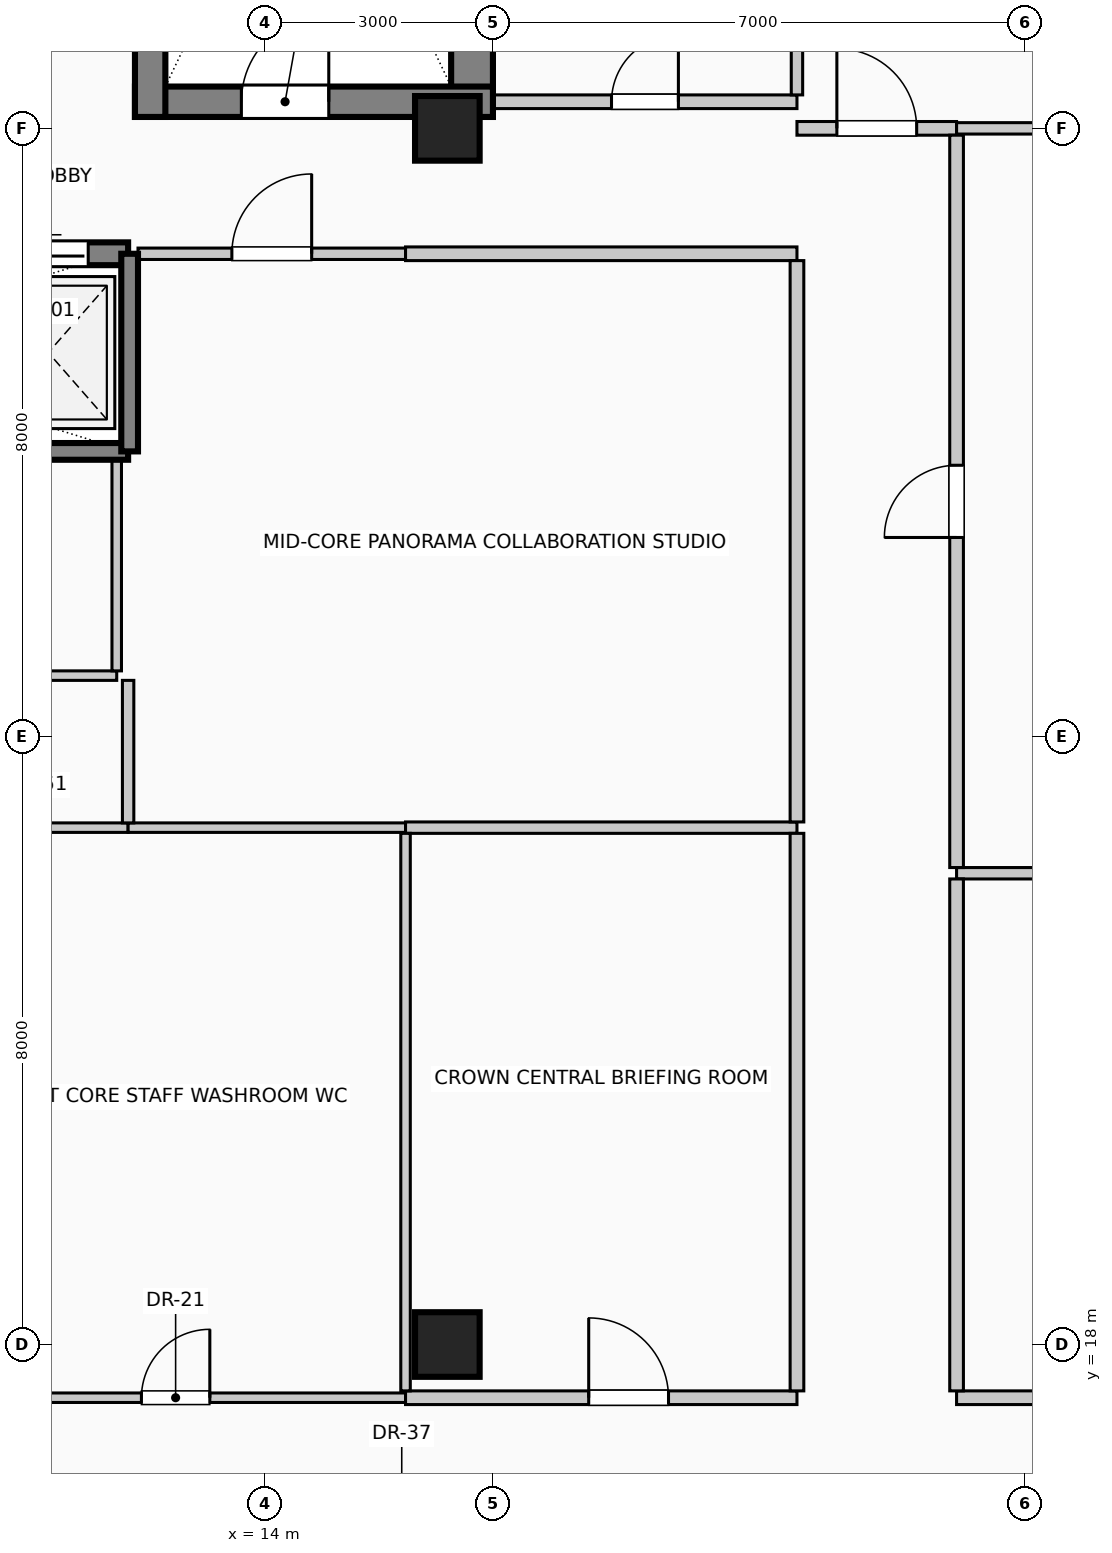
"""IFC4 building model, lengths in metres.
Left out: names, types, materials, properties, quantities, classifications, styles, units other than length and angle.
Written with IfcOpenShell. Run it as: python <this file> out.ifc"""

import sys

from ifc_helpers import new_model, si_unit, direction, frame, frame_2d, origin, origin_2d, place, context, subcontext, project, spatial, rectangle, circle, extrude, element, fill, save


model = new_model("IFC4")
c1 = context("Model", 3, precision=1e-05, world=origin(), true_north=direction((0.0, 1.0)))
c2 = subcontext(c1, "Body", "Model", "MODEL_VIEW")
j1 = project(units=[si_unit("LENGTHUNIT", "METRE"), si_unit("PLANEANGLEUNIT", "RADIAN")], contexts=[c1])
p1 = place(None, origin())
s1 = spatial("IfcSite", under=j1, at=p1, CompositionType="ELEMENT")
p2 = place(p1, origin())
s2 = spatial("IfcBuilding", under=s1, at=p2, CompositionType="ELEMENT")
p3 = place(p2, frame((0.0, 0.0, 297.0)))
s3 = spatial("IfcBuildingStorey", under=s2, at=p3, CompositionType="ELEMENT", Elevation=297.0)
p4 = place(p3, frame((16.725, 34.15, 0.0), z_axis=(0.0, 0.0, 1.0), x_axis=(0.0, 1.0, 0.0)))
e1 = element("IfcWall", 1, at=p4, inside=s3, PredefinedType="SHEAR", context=c2, shape_type="SweptSolid", body=[
    extrude(rectangle(XDim=8.83, YDim=0.55, at=frame_2d((4.415, 0.0))), origin(), (0.0, 0.0, 1.0), 4.0),
])
p5 = place(p3, frame((12.29, 34.35, 0.0), z_axis=(0.0, 0.0, 1.0), x_axis=(1.0, 0.0, 0.0)))
e2 = element("IfcWall", 2, at=p5, inside=s3, PredefinedType="SHEAR", context=c2, shape_type="SweptSolid", body=[
    extrude(rectangle(XDim=4.71, YDim=0.4, at=frame_2d((2.355, 0.0))), origin(), (0.0, 0.0, 1.0), 4.0),
])
p6 = place(p5, frame((1.4, 0.0, 0.0)))
e3 = element("IfcOpeningElement", 3, at=p6, cuts=e2, PredefinedType="OPENING", context=c2, shape_type="SweptSolid", body=[
    extrude(rectangle(XDim=1.15, YDim=2.2, at=frame_2d((0.575, 1.1))), frame((0.0, 0.21, 0.0), z_axis=(0.0, -1.0, 0.0), x_axis=(1.0, 0.0, 0.0)), (0.0, 0.0, 1.0), 0.42),
])
p7 = place(p3, frame((12.49, 34.15, 0.0), z_axis=(0.0, 0.0, 1.0), x_axis=(0.0, 1.0, 0.0)))
e4 = element("IfcWall", 4, at=p7, inside=s3, PredefinedType="SHEAR", context=c2, shape_type="SweptSolid", body=[
    extrude(rectangle(XDim=8.83, YDim=0.4, at=frame_2d((4.415, 0.0))), origin(), (0.0, 0.0, 1.0), 4.0),
])
for number, where, z_axis, x_axis in (
    (5, (16.4, 18.0, 0.0), (0.0, 0.0, 1.0), (1.0, 0.0, 0.0)),
    (6, (16.4, 34.0, 0.0), (0.0, 0.0, 1.0), (1.0, 0.0, 0.0)),
):
    element("IfcColumn", number, at=place(p3, frame(where, z_axis=z_axis, x_axis=x_axis)), inside=s3, PredefinedType="COLUMN", context=c2, shape_type="SweptSolid", body=[
        extrude(circle(Radius=0.425, at=origin_2d()), origin(), (0.0, 0.0, 1.0), 4.0),
    ])
p8 = place(p3, frame((10.05, 32.35, 0.0), z_axis=(0.0, 0.0, 1.0), x_axis=(1.0, 0.0, 0.0)))
e7 = element("IfcWall", 7, at=p8, inside=s3, PredefinedType="SOLIDWALL", context=c2, shape_type="SweptSolid", body=[
    extrude(rectangle(XDim=2.15, YDim=0.3, at=frame_2d((1.075, 0.0))), origin(), (0.0, 0.0, 1.0), 4.0),
])
p9 = place(p8, frame((0.525, 0.0, 0.0)))
e8 = element("IfcOpeningElement", 8, at=p9, cuts=e7, PredefinedType="OPENING", context=c2, shape_type="SweptSolid", body=[
    extrude(rectangle(XDim=1.1, YDim=2.2, at=frame_2d((0.55, 1.1))), frame((0.0, 0.16, 0.0), z_axis=(0.0, -1.0, 0.0), x_axis=(1.0, 0.0, 0.0)), (0.0, 0.0, 1.0), 0.32),
])
p10 = place(p3, frame((3.55, 29.75, 0.0), z_axis=(0.0, 0.0, 1.0), x_axis=(1.0, 0.0, 0.0)))
e9 = element("IfcWall", 9, at=p10, inside=s3, PredefinedType="SOLIDWALL", context=c2, shape_type="SweptSolid", body=[
    extrude(rectangle(XDim=8.65, YDim=0.22, at=frame_2d((4.325, 0.0))), origin(), (0.0, 0.0, 1.0), 4.0),
])
p11 = place(p3, frame((12.22, 29.75, 0.0), z_axis=(0.0, 0.0, 1.0), x_axis=(0.0, 1.0, 0.0)))
e10 = element("IfcWall", 10, at=p11, inside=s3, PredefinedType="SOLIDWALL", context=c2, shape_type="SweptSolid", body=[
    extrude(rectangle(XDim=2.6, YDim=0.22, at=frame_2d((1.3, 0.0))), origin(), (0.0, 0.0, 1.0), 4.0),
])
p12 = place(p3, frame((9.8, 17.3, 0.0), z_axis=(0.0, 0.0, 1.0), x_axis=(1.0, 0.0, 0.0)))
e11 = element("IfcWall", 11, at=p12, inside=s3, PredefinedType="PARTITIONING", context=c2, shape_type="SweptSolid", body=[
    extrude(rectangle(XDim=6.05, YDim=0.125, at=frame_2d((3.025, 0.0))), origin(), (0.0, 0.0, 1.0), 3.775),
])
p13 = place(p12, frame((2.575, 0.0, 0.0)))
e12 = element("IfcOpeningElement", 12, at=p13, cuts=e11, PredefinedType="OPENING", context=c2, shape_type="SweptSolid", body=[
    extrude(rectangle(XDim=0.9, YDim=2.1, at=frame_2d((0.45, 1.05))), frame((0.0, 0.073, 0.0), z_axis=(0.0, -1.0, 0.0), x_axis=(1.0, 0.0, 0.0)), (0.0, 0.0, 1.0), 0.145),
])
p14 = place(p3, frame((15.85, 17.3, 0.0), z_axis=(0.0, 0.0, 1.0), x_axis=(1.0, 0.0, 0.0)))
e13 = element("IfcWall", 13, at=p14, inside=s3, PredefinedType="PARTITIONING", context=c2, shape_type="SweptSolid", body=[
    extrude(rectangle(XDim=5.15, YDim=0.18, at=frame_2d((2.575, 0.0))), origin(), (0.0, 0.0, 1.0), 3.775),
])
p15 = place(p14, frame((2.41, 0.0, 0.0)))
e14 = element("IfcOpeningElement", 14, at=p15, cuts=e13, PredefinedType="OPENING", context=c2, shape_type="SweptSolid", body=[
    extrude(rectangle(XDim=1.05, YDim=2.15, at=frame_2d((0.525, 1.075))), frame((0.0, 0.1, 0.0), z_axis=(0.0, -1.0, 0.0), x_axis=(1.0, 0.0, 0.0)), (0.0, 0.0, 1.0), 0.2),
])
p16 = place(p3, frame((23.1, 17.3, 0.0), z_axis=(0.0, 0.0, 1.0), x_axis=(1.0, 0.0, 0.0)))
e15 = element("IfcWall", 15, at=p16, inside=s3, PredefinedType="PARTITIONING", context=c2, shape_type="SweptSolid", body=[
    extrude(rectangle(XDim=18.38, YDim=0.18, at=frame_2d((9.19, 0.0))), origin(), (0.0, 0.0, 1.0), 3.775),
])
p17 = place(p16, frame((8.175, 0.0, 0.0)))
e16 = element("IfcOpeningElement", 16, at=p17, cuts=e15, PredefinedType="OPENING", context=c2, shape_type="SweptSolid", body=[
    extrude(rectangle(XDim=0.95, YDim=2.15, at=frame_2d((0.475, 1.075))), frame((0.0, 0.1, 0.0), z_axis=(0.0, -1.0, 0.0), x_axis=(1.0, 0.0, 0.0)), (0.0, 0.0, 1.0), 0.2),
])
p18 = place(p3, frame((23.1, 24.2, 0.0), z_axis=(0.0, 0.0, 1.0), x_axis=(1.0, 0.0, 0.0)))
e17 = element("IfcWall", 17, at=p18, inside=s3, PredefinedType="PARTITIONING", context=c2, shape_type="SweptSolid", body=[
    extrude(rectangle(XDim=18.7, YDim=0.15, at=frame_2d((9.35, 0.0))), origin(), (0.0, 0.0, 1.0), 3.775),
])
p19 = place(p3, frame((9.8, 24.8, 0.0), z_axis=(0.0, 0.0, 1.0), x_axis=(1.0, 0.0, 0.0)))
e18 = element("IfcWall", 18, at=p19, inside=s3, PredefinedType="PARTITIONING", context=c2, shape_type="SweptSolid", body=[
    extrude(rectangle(XDim=2.4, YDim=0.125, at=frame_2d((1.2, 0.0))), origin(), (0.0, 0.0, 1.0), 3.775),
])
p20 = place(p3, frame((12.2, 24.8, 0.0), z_axis=(0.0, 0.0, 1.0), x_axis=(1.0, 0.0, 0.0)))
e19 = element("IfcWall", 19, at=p20, inside=s3, PredefinedType="PARTITIONING", context=c2, shape_type="SweptSolid", body=[
    extrude(rectangle(XDim=3.65, YDim=0.125, at=frame_2d((1.825, 0.0))), origin(), (0.0, 0.0, 1.0), 3.775),
])
p21 = place(p3, frame((15.85, 24.8, 0.0), z_axis=(0.0, 0.0, 1.0), x_axis=(1.0, 0.0, 0.0)))
e20 = element("IfcWall", 20, at=p21, inside=s3, PredefinedType="PARTITIONING", context=c2, shape_type="SweptSolid", body=[
    extrude(rectangle(XDim=5.15, YDim=0.15, at=frame_2d((2.575, 0.0))), origin(), (0.0, 0.0, 1.0), 3.775),
])
p22 = place(p3, frame((7.89, 26.8, 0.0), z_axis=(0.0, 0.0, 1.0), x_axis=(1.0, 0.0, 0.0)))
e21 = element("IfcWall", 21, at=p22, inside=s3, PredefinedType="PARTITIONING", context=c2, shape_type="SweptSolid", body=[
    extrude(rectangle(XDim=4.16, YDim=0.125, at=frame_2d((2.08, 0.0))), origin(), (0.0, 0.0, 1.0), 3.775),
])
p23 = place(p22, frame((1.62, 0.0, 0.0)))
e22 = element("IfcOpeningElement", 22, at=p23, cuts=e21, PredefinedType="OPENING", context=c2, shape_type="SweptSolid", body=[
    extrude(rectangle(XDim=0.92, YDim=2.1, at=frame_2d((0.46, 1.05))), frame((0.0, 0.073, 0.0), z_axis=(0.0, -1.0, 0.0), x_axis=(1.0, 0.0, 0.0)), (0.0, 0.0, 1.0), 0.145),
])
p24 = place(p3, frame((12.33, 32.35, 0.0), z_axis=(0.0, 0.0, 1.0), x_axis=(1.0, 0.0, 0.0)))
e23 = element("IfcWall", 23, at=p24, inside=s3, PredefinedType="PARTITIONING", context=c2, shape_type="SweptSolid", body=[
    extrude(rectangle(XDim=3.52, YDim=0.15, at=frame_2d((1.76, 0.0))), origin(), (0.0, 0.0, 1.0), 3.775),
])
p25 = place(p24, frame((1.235, 0.0, 0.0)))
e24 = element("IfcOpeningElement", 24, at=p25, cuts=e23, PredefinedType="OPENING", context=c2, shape_type="SweptSolid", body=[
    extrude(rectangle(XDim=1.05, YDim=2.15, at=frame_2d((0.525, 1.075))), frame((0.0, 0.085, 0.0), z_axis=(0.0, -1.0, 0.0), x_axis=(1.0, 0.0, 0.0)), (0.0, 0.0, 1.0), 0.17),
])
p26 = place(p3, frame((15.85, 32.35, 0.0), z_axis=(0.0, 0.0, 1.0), x_axis=(1.0, 0.0, 0.0)))
e25 = element("IfcWall", 25, at=p26, inside=s3, PredefinedType="PARTITIONING", context=c2, shape_type="SweptSolid", body=[
    extrude(rectangle(XDim=5.15, YDim=0.18, at=frame_2d((2.575, 0.0))), origin(), (0.0, 0.0, 1.0), 3.775),
])
p27 = place(p3, frame((21.0, 34.0, 0.0), z_axis=(0.0, 0.0, 1.0), x_axis=(1.0, 0.0, 0.0)))
e26 = element("IfcWall", 26, at=p27, inside=s3, PredefinedType="PARTITIONING", context=c2, shape_type="SweptSolid", body=[
    extrude(rectangle(XDim=2.1, YDim=0.18, at=frame_2d((1.05, 0.0))), origin(), (0.0, 0.0, 1.0), 3.27),
])
p28 = place(p27, frame((0.525, 0.0, 0.0)))
e27 = element("IfcOpeningElement", 27, at=p28, cuts=e26, PredefinedType="OPENING", context=c2, shape_type="SweptSolid", body=[
    extrude(rectangle(XDim=1.05, YDim=2.15, at=frame_2d((0.525, 1.075))), frame((0.0, 0.1, 0.0), z_axis=(0.0, -1.0, 0.0), x_axis=(1.0, 0.0, 0.0)), (0.0, 0.0, 1.0), 0.2),
])
p29 = place(p3, frame((23.1, 34.0, 0.0), z_axis=(0.0, 0.0, 1.0), x_axis=(1.0, 0.0, 0.0)))
e28 = element("IfcWall", 28, at=p29, inside=s3, PredefinedType="PARTITIONING", context=c2, shape_type="SweptSolid", body=[
    extrude(rectangle(XDim=5.475, YDim=0.15, at=frame_2d((2.737, 0.0))), origin(), (0.0, 0.0, 1.0), 3.27),
])
p30 = place(p3, frame((17.0, 34.35, 0.0), z_axis=(0.0, 0.0, 1.0), x_axis=(1.0, 0.0, 0.0)))
e29 = element("IfcWall", 29, at=p30, inside=s3, PredefinedType="PARTITIONING", context=c2, shape_type="SweptSolid", body=[
    extrude(rectangle(XDim=4.0, YDim=0.18, at=frame_2d((2.0, 0.0))), origin(), (0.0, 0.0, 1.0), 3.775),
])
p31 = place(p30, frame((1.56, 0.0, 0.0)))
e30 = element("IfcOpeningElement", 30, at=p31, cuts=e29, PredefinedType="OPENING", context=c2, shape_type="SweptSolid", body=[
    extrude(rectangle(XDim=0.88, YDim=2.1, at=frame_2d((0.44, 1.05))), frame((0.0, 0.1, 0.0), z_axis=(0.0, -1.0, 0.0), x_axis=(1.0, 0.0, 0.0)), (0.0, 0.0, 1.0), 0.2),
])
p32 = place(p3, frame((12.05, 26.863, 0.0), z_axis=(0.0, 0.0, 1.0), x_axis=(0.0, 1.0, 0.0)))
e31 = element("IfcWall", 31, at=p32, inside=s3, PredefinedType="PARTITIONING", context=c2, shape_type="SweptSolid", body=[
    extrude(rectangle(XDim=2.777, YDim=0.125, at=frame_2d((1.389, 0.0))), origin(), (0.0, 0.0, 1.0), 3.775),
])
p33 = place(p3, frame((12.2, 24.863, 0.0), z_axis=(0.0, 0.0, 1.0), x_axis=(0.0, 1.0, 0.0)))
e32 = element("IfcWall", 32, at=p33, inside=s3, PredefinedType="PARTITIONING", context=c2, shape_type="SweptSolid", body=[
    extrude(rectangle(XDim=1.875, YDim=0.15, at=frame_2d((0.938, 0.0))), origin(), (0.0, 0.0, 1.0), 3.775),
])
p34 = place(p3, frame((15.85, 17.39, 0.0), z_axis=(0.0, 0.0, 1.0), x_axis=(0.0, 1.0, 0.0)))
e33 = element("IfcWall", 33, at=p34, inside=s3, PredefinedType="PARTITIONING", context=c2, shape_type="SweptSolid", body=[
    extrude(rectangle(XDim=7.335, YDim=0.125, at=frame_2d((3.667, 0.0))), origin(), (0.0, 0.0, 1.0), 3.775),
])
p35 = place(p3, frame((21.0, 17.39, 0.0), z_axis=(0.0, 0.0, 1.0), x_axis=(0.0, 1.0, 0.0)))
e34 = element("IfcWall", 34, at=p35, inside=s3, PredefinedType="PARTITIONING", context=c2, shape_type="SweptSolid", body=[
    extrude(rectangle(XDim=7.335, YDim=0.18, at=frame_2d((3.667, 0.0))), origin(), (0.0, 0.0, 1.0), 3.775),
])
p36 = place(p3, frame((21.0, 24.875, 0.0), z_axis=(0.0, 0.0, 1.0), x_axis=(0.0, 1.0, 0.0)))
e35 = element("IfcWall", 35, at=p36, inside=s3, PredefinedType="PARTITIONING", context=c2, shape_type="SweptSolid", body=[
    extrude(rectangle(XDim=7.385, YDim=0.18, at=frame_2d((3.692, 0.0))), origin(), (0.0, 0.0, 1.0), 3.775),
])
p37 = place(p3, frame((21.0, 34.44, 0.0), z_axis=(0.0, 0.0, 1.0), x_axis=(0.0, 1.0, 0.0)))
e36 = element("IfcWall", 36, at=p37, inside=s3, PredefinedType="PARTITIONING", context=c2, shape_type="SweptSolid", body=[
    extrude(rectangle(XDim=10.84, YDim=0.15, at=frame_2d((5.42, 0.0))), origin(), (0.0, 0.0, 1.0), 3.775),
])
p38 = place(p3, frame((23.1, 17.39, 0.0), z_axis=(0.0, 0.0, 1.0), x_axis=(0.0, 1.0, 0.0)))
e37 = element("IfcWall", 37, at=p38, inside=s3, PredefinedType="PARTITIONING", context=c2, shape_type="SweptSolid", body=[
    extrude(rectangle(XDim=6.735, YDim=0.18, at=frame_2d((3.368, 0.0))), origin(), (0.0, 0.0, 1.0), 3.775),
])
p39 = place(p3, frame((23.1, 24.275, 0.0), z_axis=(0.0, 0.0, 1.0), x_axis=(0.0, 1.0, 0.0)))
e38 = element("IfcWall", 38, at=p39, inside=s3, PredefinedType="PARTITIONING", context=c2, shape_type="SweptSolid", body=[
    extrude(rectangle(XDim=9.635, YDim=0.18, at=frame_2d((4.817, 0.0))), origin(), (0.0, 0.0, 1.0), 3.775),
])
p40 = place(p39, frame((4.343, 0.0, 0.0)))
e39 = element("IfcOpeningElement", 39, at=p40, cuts=e38, PredefinedType="OPENING", context=c2, shape_type="SweptSolid", body=[
    extrude(rectangle(XDim=0.95, YDim=2.15, at=frame_2d((0.475, 1.075))), frame((0.0, 0.1, 0.0), z_axis=(0.0, -1.0, 0.0), x_axis=(1.0, 0.0, 0.0)), (0.0, 0.0, 1.0), 0.2),
])
p41 = place(p9, origin())
e40 = element("IfcDoor", 40, at=p41, inside=s3, OperationType="SLIDING_TO_RIGHT", PredefinedType="DOOR", context=c2, shape_type="SweptSolid", body=[
    extrude(rectangle(XDim=1.1, YDim=2.2, at=frame_2d((0.55, 1.1))), frame((0.0, 0.025, 0.0), z_axis=(0.0, -1.0, 0.0), x_axis=(1.0, 0.0, 0.0)), (0.0, 0.0, 1.0), 0.05),
])
fill(e8, e40)
p42 = place(p6, origin())
e41 = element("IfcDoor", 41, at=p42, inside=s3, OperationType="SINGLE_SWING_RIGHT", PredefinedType="DOOR", context=c2, shape_type="SweptSolid", body=[
    extrude(rectangle(XDim=1.15, YDim=2.2, at=frame_2d((0.575, 1.1))), frame((0.0, 0.025, 0.0), z_axis=(0.0, -1.0, 0.0), x_axis=(1.0, 0.0, 0.0)), (0.0, 0.0, 1.0), 0.05),
])
fill(e3, e41)
p43 = place(p13, origin())
e42 = element("IfcDoor", 42, at=p43, inside=s3, OperationType="SINGLE_SWING_RIGHT", PredefinedType="DOOR", context=c2, shape_type="SweptSolid", body=[
    extrude(rectangle(XDim=0.9, YDim=2.1, at=frame_2d((0.45, 1.05))), frame((0.0, 0.025, 0.0), z_axis=(0.0, -1.0, 0.0), x_axis=(1.0, 0.0, 0.0)), (0.0, 0.0, 1.0), 0.05),
])
fill(e12, e42)
p44 = place(p15, origin())
e43 = element("IfcDoor", 43, at=p44, inside=s3, OperationType="SINGLE_SWING_LEFT", PredefinedType="DOOR", context=c2, shape_type="SweptSolid", body=[
    extrude(rectangle(XDim=1.05, YDim=2.15, at=frame_2d((0.525, 1.075))), frame((0.0, 0.025, 0.0), z_axis=(0.0, -1.0, 0.0), x_axis=(1.0, 0.0, 0.0)), (0.0, 0.0, 1.0), 0.05),
])
fill(e14, e43)
p45 = place(p25, origin())
e44 = element("IfcDoor", 44, at=p45, inside=s3, OperationType="SINGLE_SWING_RIGHT", PredefinedType="DOOR", context=c2, shape_type="SweptSolid", body=[
    extrude(rectangle(XDim=1.05, YDim=2.15, at=frame_2d((0.525, 1.075))), frame((0.0, 0.025, 0.0), z_axis=(0.0, -1.0, 0.0), x_axis=(1.0, 0.0, 0.0)), (0.0, 0.0, 1.0), 0.05),
])
fill(e24, e44)
p46 = place(p28, origin())
e45 = element("IfcDoor", 45, at=p46, inside=s3, OperationType="SINGLE_SWING_LEFT", PredefinedType="DOOR", context=c2, shape_type="SweptSolid", body=[
    extrude(rectangle(XDim=1.05, YDim=2.15, at=frame_2d((0.525, 1.075))), frame((0.0, 0.025, 0.0), z_axis=(0.0, -1.0, 0.0), x_axis=(1.0, 0.0, 0.0)), (0.0, 0.0, 1.0), 0.05),
])
fill(e27, e45)
p47 = place(p31, origin())
e46 = element("IfcDoor", 46, at=p47, inside=s3, OperationType="SINGLE_SWING_RIGHT", PredefinedType="DOOR", context=c2, shape_type="SweptSolid", body=[
    extrude(rectangle(XDim=0.88, YDim=2.1, at=frame_2d((0.44, 1.05))), frame((0.0, 0.025, 0.0), z_axis=(0.0, -1.0, 0.0), x_axis=(1.0, 0.0, 0.0)), (0.0, 0.0, 1.0), 0.05),
])
fill(e30, e46)
p48 = place(p40, origin())
e47 = element("IfcDoor", 47, at=p48, inside=s3, OperationType="SINGLE_SWING_LEFT", PredefinedType="DOOR", context=c2, shape_type="SweptSolid", body=[
    extrude(rectangle(XDim=0.95, YDim=2.15, at=frame_2d((0.475, 1.075))), frame((0.0, 0.025, 0.0), z_axis=(0.0, -1.0, 0.0), x_axis=(1.0, 0.0, 0.0)), (0.0, 0.0, 1.0), 0.05),
])
fill(e39, e47)
save(model, sys.argv[1])
